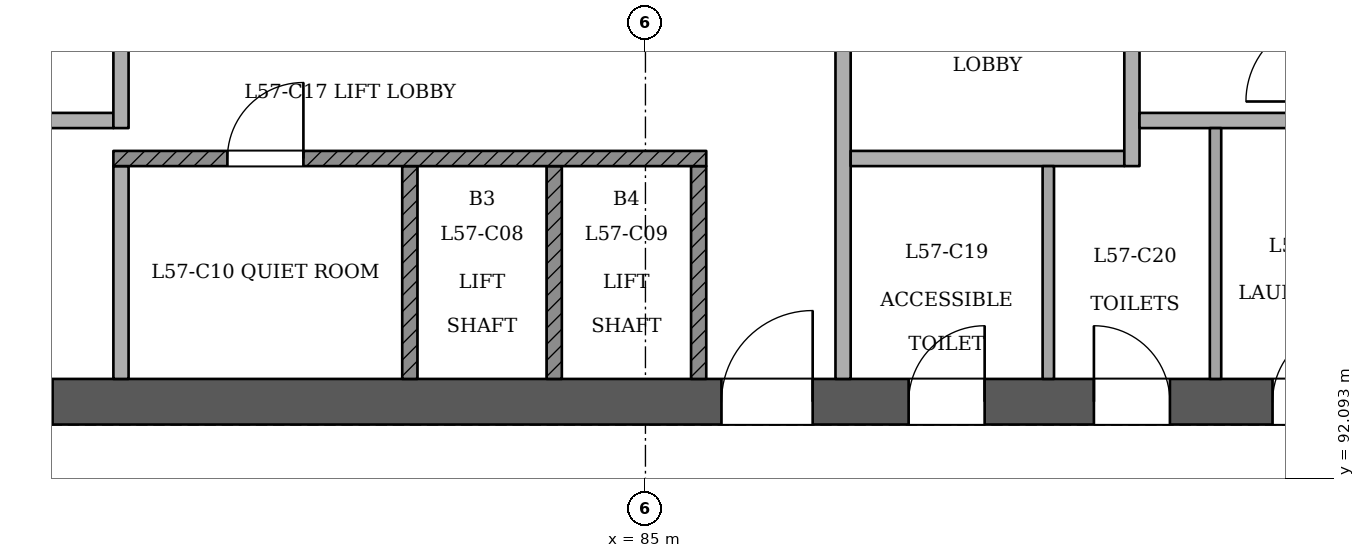
"""IFC4 building model, lengths in metres.
Left out: names, types, materials, properties, quantities, classifications, styles, units other than length and angle.
Written with IfcOpenShell. Run it as: python <this file> out.ifc"""

import sys

from ifc_helpers import new_model, si_unit, direction, frame, frame_2d, origin, place, context, subcontext, project, spatial, rectangle, extrude, element, fill, save


model = new_model("IFC4")
c1 = context("Model", 3, precision=1e-05, world=origin(), true_north=direction((0.0, 1.0)))
c2 = subcontext(c1, "Body", "Model", "MODEL_VIEW")
j1 = project(units=[si_unit("LENGTHUNIT", "METRE"), si_unit("PLANEANGLEUNIT", "RADIAN")], contexts=[c1])
p1 = place(None, origin())
s1 = spatial("IfcSite", under=j1, at=p1, CompositionType="ELEMENT")
p2 = place(p1, origin())
s2 = spatial("IfcBuilding", under=s1, at=p2, CompositionType="ELEMENT")
p3 = place(p2, frame((0.0, 0.0, 223.0)))
s3 = spatial("IfcBuildingStorey", under=s2, at=p3, CompositionType="ELEMENT", Elevation=223.0)
p4 = place(p3, frame((72.7, 93.1, 0.0), z_axis=(0.0, 0.0, 1.0), x_axis=(1.0, 0.0, 0.0)))
e1 = element("IfcWall", 1, at=p4, inside=s3, PredefinedType="SHEAR", context=c2, shape_type="SweptSolid", body=[
    extrude(rectangle(XDim=24.9, YDim=0.6, at=frame_2d((12.45, 0.0))), origin(), (0.0, 0.0, 1.0), 3.6),
])
p5 = place(p4, frame((1.1, 0.0, 0.0)))
e2 = element("IfcOpeningElement", 2, at=p5, cuts=e1, PredefinedType="OPENING", context=c2, shape_type="SweptSolid", body=[
    extrude(rectangle(XDim=1.2, YDim=2.1, at=frame_2d((0.6, 1.05))), frame((0.0, 0.311, 0.0), z_axis=(0.0, -1.0, 0.0), x_axis=(1.0, 0.0, 0.0)), (0.0, 0.0, 1.0), 0.621),
])
p6 = place(p4, frame((3.3, 0.0, 0.0)))
e3 = element("IfcOpeningElement", 3, at=p6, cuts=e1, PredefinedType="OPENING", context=c2, shape_type="SweptSolid", body=[
    extrude(rectangle(XDim=1.2, YDim=2.1, at=frame_2d((0.6, 1.05))), frame((0.0, 0.311, 0.0), z_axis=(0.0, -1.0, 0.0), x_axis=(1.0, 0.0, 0.0)), (0.0, 0.0, 1.0), 0.621),
])
p7 = place(p4, frame((13.3, 0.0, 0.0)))
e4 = element("IfcOpeningElement", 4, at=p7, cuts=e1, PredefinedType="OPENING", context=c2, shape_type="SweptSolid", body=[
    extrude(rectangle(XDim=1.2, YDim=2.1, at=frame_2d((0.6, 1.05))), frame((0.0, 0.311, 0.0), z_axis=(0.0, -1.0, 0.0), x_axis=(1.0, 0.0, 0.0)), (0.0, 0.0, 1.0), 0.621),
])
p8 = place(p4, frame((15.762, 0.0, 0.0)))
e5 = element("IfcOpeningElement", 5, at=p8, cuts=e1, PredefinedType="OPENING", context=c2, shape_type="SweptSolid", body=[
    extrude(rectangle(XDim=1.0, YDim=2.1, at=frame_2d((0.5, 1.05))), frame((0.0, 0.311, 0.0), z_axis=(0.0, -1.0, 0.0), x_axis=(1.0, 0.0, 0.0)), (0.0, 0.0, 1.0), 0.621),
])
p9 = place(p4, frame((18.2, 0.0, 0.0)))
e6 = element("IfcOpeningElement", 6, at=p9, cuts=e1, PredefinedType="OPENING", context=c2, shape_type="SweptSolid", body=[
    extrude(rectangle(XDim=1.0, YDim=2.1, at=frame_2d((0.5, 1.05))), frame((0.0, 0.311, 0.0), z_axis=(0.0, -1.0, 0.0), x_axis=(1.0, 0.0, 0.0)), (0.0, 0.0, 1.0), 0.621),
])
p10 = place(p4, frame((20.55, 0.0, 0.0)))
e7 = element("IfcOpeningElement", 7, at=p10, cuts=e1, PredefinedType="OPENING", context=c2, shape_type="SweptSolid", body=[
    extrude(rectangle(XDim=1.0, YDim=2.1, at=frame_2d((0.5, 1.05))), frame((0.0, 0.311, 0.0), z_axis=(0.0, -1.0, 0.0), x_axis=(1.0, 0.0, 0.0)), (0.0, 0.0, 1.0), 0.621),
])
p11 = place(p4, frame((22.837, 0.0, 0.0)))
e8 = element("IfcOpeningElement", 8, at=p11, cuts=e1, PredefinedType="OPENING", context=c2, shape_type="SweptSolid", body=[
    extrude(rectangle(XDim=1.0, YDim=2.1, at=frame_2d((0.5, 1.05))), frame((0.0, 0.311, 0.0), z_axis=(0.0, -1.0, 0.0), x_axis=(1.0, 0.0, 0.0)), (0.0, 0.0, 1.0), 0.621),
])
p12 = place(p3, frame((78.1, 93.4, 0.0), z_axis=(0.0, 0.0, 1.0), x_axis=(0.0, 1.0, 0.0)))
e9 = element("IfcWall", 9, at=p12, inside=s3, PredefinedType="PARTITIONING", context=c2, shape_type="SweptSolid", body=[
    extrude(rectangle(XDim=2.8, YDim=0.2, at=frame_2d((1.4, 0.0))), origin(), (0.0, 0.0, 1.0), 3.2),
])
for number, where, z_axis, x_axis in (
    (10, (81.9, 93.4, 0.0), (0.0, 0.0, 1.0), (0.0, 1.0, 0.0)),
    (11, (83.8, 93.4, 0.0), (0.0, 0.0, 1.0), (0.0, 1.0, 0.0)),
    (12, (85.7, 93.4, 0.0), (0.0, 0.0, 1.0), (0.0, 1.0, 0.0)),
):
    element("IfcWall", number, at=place(p3, frame(where, z_axis=z_axis, x_axis=x_axis)), inside=s3, PredefinedType="SOLIDWALL", context=c2, shape_type="SweptSolid", body=[
        extrude(rectangle(XDim=2.8, YDim=0.2, at=frame_2d((1.4, 0.0))), origin(), (0.0, 0.0, 1.0), 3.2),
    ])
p13 = place(p3, frame((87.6, 93.4, 0.0), z_axis=(0.0, 0.0, 1.0), x_axis=(0.0, 1.0, 0.0)))
e13 = element("IfcWall", 13, at=p13, inside=s3, PredefinedType="PARTITIONING", context=c2, shape_type="SweptSolid", body=[
    extrude(rectangle(XDim=7.0, YDim=0.2, at=frame_2d((3.5, 0.0))), origin(), (0.0, 0.0, 1.0), 3.2),
])
p14 = place(p13, frame((4.45, 0.0, 0.0)))
e14 = element("IfcOpeningElement", 14, at=p14, cuts=e13, PredefinedType="OPENING", context=c2, shape_type="SweptSolid", body=[
    extrude(rectangle(XDim=1.1, YDim=2.1, at=frame_2d((0.55, 1.05))), frame((0.0, 0.11, 0.0), z_axis=(0.0, -1.0, 0.0), x_axis=(1.0, 0.0, 0.0)), (0.0, 0.0, 1.0), 0.221),
])
p15 = place(p3, frame((90.3, 93.4, 0.0), z_axis=(0.0, 0.0, 1.0), x_axis=(0.0, 1.0, 0.0)))
e15 = element("IfcWall", 15, at=p15, inside=s3, PredefinedType="PARTITIONING", context=c2, shape_type="SweptSolid", body=[
    extrude(rectangle(XDim=2.8, YDim=0.15, at=frame_2d((1.4, 0.0))), origin(), (0.0, 0.0, 1.0), 3.2),
])
p16 = place(p3, frame((92.5, 93.4, 0.0), z_axis=(0.0, 0.0, 1.0), x_axis=(0.0, 1.0, 0.0)))
e16 = element("IfcWall", 16, at=p16, inside=s3, PredefinedType="PARTITIONING", context=c2, shape_type="SweptSolid", body=[
    extrude(rectangle(XDim=3.3, YDim=0.15, at=frame_2d((1.65, 0.0))), origin(), (0.0, 0.0, 1.0), 3.2),
])
p17 = place(p3, frame((78.0, 96.3, 0.0), z_axis=(0.0, 0.0, 1.0), x_axis=(1.0, 0.0, 0.0)))
e17 = element("IfcWall", 17, at=p17, inside=s3, PredefinedType="SOLIDWALL", context=c2, shape_type="SweptSolid", body=[
    extrude(rectangle(XDim=7.8, YDim=0.2, at=frame_2d((3.9, 0.0))), origin(), (0.0, 0.0, 1.0), 3.2),
])
p18 = place(p17, frame((1.5, 0.0, 0.0)))
e18 = element("IfcOpeningElement", 18, at=p18, cuts=e17, PredefinedType="OPENING", context=c2, shape_type="SweptSolid", body=[
    extrude(rectangle(XDim=1.0, YDim=2.1, at=frame_2d((0.5, 1.05))), frame((0.0, 0.11, 0.0), z_axis=(0.0, -1.0, 0.0), x_axis=(1.0, 0.0, 0.0)), (0.0, 0.0, 1.0), 0.221),
])
p19 = place(p3, frame((87.7, 96.3, 0.0), z_axis=(0.0, 0.0, 1.0), x_axis=(1.0, 0.0, 0.0)))
e19 = element("IfcWall", 19, at=p19, inside=s3, PredefinedType="PARTITIONING", context=c2, shape_type="SweptSolid", body=[
    extrude(rectangle(XDim=3.6, YDim=0.2, at=frame_2d((1.8, 0.0))), origin(), (0.0, 0.0, 1.0), 3.2),
])
p20 = place(p3, frame((91.4, 96.2, 0.0), z_axis=(0.0, 0.0, 1.0), x_axis=(0.0, 1.0, 0.0)))
e20 = element("IfcWall", 20, at=p20, inside=s3, PredefinedType="PARTITIONING", context=c2, shape_type="SweptSolid", body=[
    extrude(rectangle(XDim=4.2, YDim=0.2, at=frame_2d((2.1, 0.0))), origin(), (0.0, 0.0, 1.0), 3.2),
])
p21 = place(p20, frame((2.45, 0.0, 0.0)))
e21 = element("IfcOpeningElement", 21, at=p21, cuts=e20, PredefinedType="OPENING", context=c2, shape_type="SweptSolid", body=[
    extrude(rectangle(XDim=1.1, YDim=2.1, at=frame_2d((0.55, 1.05))), frame((0.0, 0.11, 0.0), z_axis=(0.0, -1.0, 0.0), x_axis=(1.0, 0.0, 0.0)), (0.0, 0.0, 1.0), 0.221),
])
p22 = place(p3, frame((76.1, 96.8, 0.0), z_axis=(0.0, 0.0, 1.0), x_axis=(1.0, 0.0, 0.0)))
e22 = element("IfcWall", 22, at=p22, inside=s3, PredefinedType="PARTITIONING", context=c2, shape_type="SweptSolid", body=[
    extrude(rectangle(XDim=1.9, YDim=0.2, at=frame_2d((0.95, 0.0))), origin(), (0.0, 0.0, 1.0), 3.2),
])
p23 = place(p3, frame((78.1, 96.7, 0.0), z_axis=(0.0, 0.0, 1.0), x_axis=(0.0, 1.0, 0.0)))
e23 = element("IfcWall", 23, at=p23, inside=s3, PredefinedType="PARTITIONING", context=c2, shape_type="SweptSolid", body=[
    extrude(rectangle(XDim=3.7, YDim=0.2, at=frame_2d((1.85, 0.0))), origin(), (0.0, 0.0, 1.0), 3.2),
])
p24 = place(p23, frame((1.95, 0.0, 0.0)))
e24 = element("IfcOpeningElement", 24, at=p24, cuts=e23, PredefinedType="OPENING", context=c2, shape_type="SweptSolid", body=[
    extrude(rectangle(XDim=1.1, YDim=2.1, at=frame_2d((0.55, 1.05))), frame((0.0, 0.11, 0.0), z_axis=(0.0, -1.0, 0.0), x_axis=(1.0, 0.0, 0.0)), (0.0, 0.0, 1.0), 0.221),
])
p25 = place(p3, frame((91.5, 96.8, 0.0), z_axis=(0.0, 0.0, 1.0), x_axis=(1.0, 0.0, 0.0)))
e25 = element("IfcWall", 25, at=p25, inside=s3, PredefinedType="PARTITIONING", context=c2, shape_type="SweptSolid", body=[
    extrude(rectangle(XDim=2.4, YDim=0.2, at=frame_2d((1.2, 0.0))), origin(), (0.0, 0.0, 1.0), 3.2),
])
p26 = place(p6, origin())
e26 = element("IfcDoor", 26, at=p26, inside=s3, OperationType="SINGLE_SWING_LEFT", PredefinedType="NOTDEFINED", context=c2, shape_type="SweptSolid", body=[
    extrude(rectangle(XDim=1.2, YDim=2.1, at=frame_2d((0.6, 1.05))), frame((0.0, 0.025, 0.0), z_axis=(0.0, -1.0, 0.0), x_axis=(1.0, 0.0, 0.0)), (0.0, 0.0, 1.0), 0.05),
])
fill(e3, e26)
p27 = place(p7, origin())
e27 = element("IfcDoor", 27, at=p27, inside=s3, OperationType="SINGLE_SWING_RIGHT", PredefinedType="NOTDEFINED", context=c2, shape_type="SweptSolid", body=[
    extrude(rectangle(XDim=1.2, YDim=2.1, at=frame_2d((0.6, 1.05))), frame((0.0, 0.025, 0.0), z_axis=(0.0, -1.0, 0.0), x_axis=(1.0, 0.0, 0.0)), (0.0, 0.0, 1.0), 0.05),
])
fill(e4, e27)
p28 = place(p8, origin())
e28 = element("IfcDoor", 28, at=p28, inside=s3, OperationType="SINGLE_SWING_RIGHT", PredefinedType="NOTDEFINED", context=c2, shape_type="SweptSolid", body=[
    extrude(rectangle(XDim=1.0, YDim=2.1, at=frame_2d((0.5, 1.05))), frame((0.0, 0.025, 0.0), z_axis=(0.0, -1.0, 0.0), x_axis=(1.0, 0.0, 0.0)), (0.0, 0.0, 1.0), 0.05),
])
fill(e5, e28)
p29 = place(p9, origin())
e29 = element("IfcDoor", 29, at=p29, inside=s3, OperationType="SINGLE_SWING_LEFT", PredefinedType="NOTDEFINED", context=c2, shape_type="SweptSolid", body=[
    extrude(rectangle(XDim=1.0, YDim=2.1, at=frame_2d((0.5, 1.05))), frame((0.0, 0.025, 0.0), z_axis=(0.0, -1.0, 0.0), x_axis=(1.0, 0.0, 0.0)), (0.0, 0.0, 1.0), 0.05),
])
fill(e6, e29)
p30 = place(p10, origin())
e30 = element("IfcDoor", 30, at=p30, inside=s3, OperationType="SINGLE_SWING_RIGHT", PredefinedType="NOTDEFINED", context=c2, shape_type="SweptSolid", body=[
    extrude(rectangle(XDim=1.0, YDim=2.1, at=frame_2d((0.5, 1.05))), frame((0.0, 0.025, 0.0), z_axis=(0.0, -1.0, 0.0), x_axis=(1.0, 0.0, 0.0)), (0.0, 0.0, 1.0), 0.05),
])
fill(e7, e30)
p31 = place(p18, origin())
e31 = element("IfcDoor", 31, at=p31, inside=s3, OperationType="SINGLE_SWING_RIGHT", PredefinedType="NOTDEFINED", context=c2, shape_type="SweptSolid", body=[
    extrude(rectangle(XDim=1.0, YDim=2.1, at=frame_2d((0.5, 1.05))), frame((0.0, 0.025, 0.0), z_axis=(0.0, -1.0, 0.0), x_axis=(1.0, 0.0, 0.0)), (0.0, 0.0, 1.0), 0.05),
])
fill(e18, e31)
save(model, sys.argv[1])
